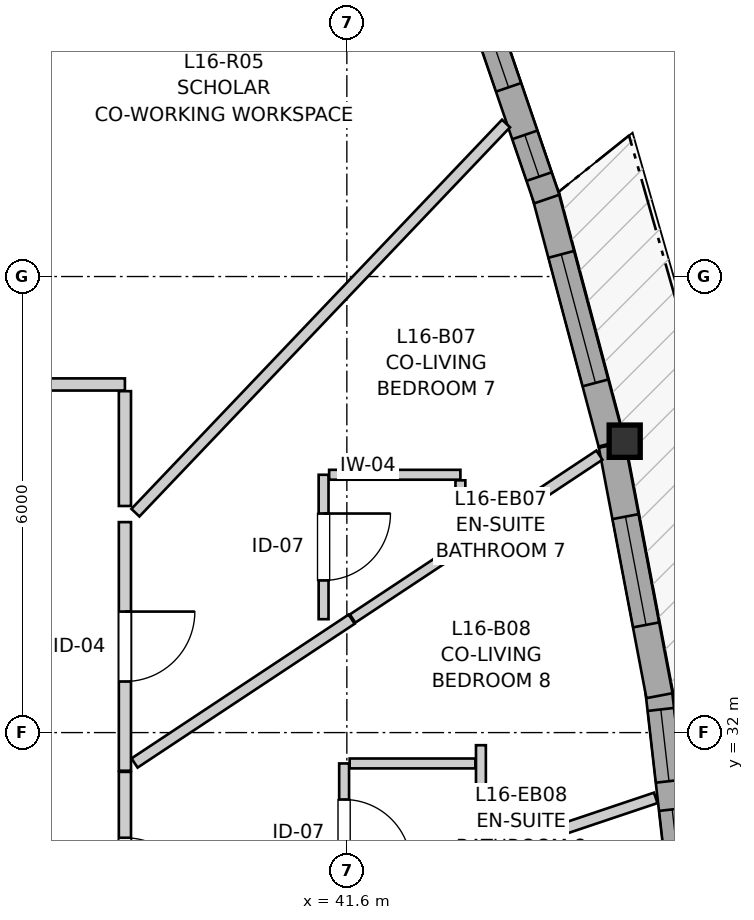
"""IFC4 building model, lengths in metres.
Left out: names, types, materials, properties, quantities, classifications, styles, units other than length and angle.
Written with IfcOpenShell. Run it as: python <this file> out.ifc"""

import sys

from ifc_helpers import new_model, si_unit, direction, frame, frame_2d, origin, origin_2d, place, context, subcontext, project, spatial, rectangle, i_section, extrude, source, transform, mapped, element, fill, save


model = new_model("IFC4")
c1 = context("Model", 3, precision=1e-05, world=origin(), true_north=direction((0.0, 1.0)))
c2 = subcontext(c1, "Body", "Model", "MODEL_VIEW")
j1 = project(units=[si_unit("LENGTHUNIT", "METRE"), si_unit("PLANEANGLEUNIT", "RADIAN")], contexts=[c1])
p1 = place(None, origin())
s1 = spatial("IfcSite", under=j1, at=p1, CompositionType="ELEMENT")
p2 = place(p1, origin())
s2 = spatial("IfcBuilding", under=s1, at=p2, CompositionType="ELEMENT")
p3 = place(p2, frame((0.0, 0.0, 55.8)))
s3 = spatial("IfcBuildingStorey", under=s2, at=p3, CompositionType="ELEMENT", Elevation=55.8)
m1 = source(origin(), c2, "Body", "SweptSolid", [
    extrude(i_section(OverallWidth=0.409, OverallDepth=0.425, WebThickness=0.03, FlangeThickness=0.048, FilletRadius=0.015, at=origin_2d()), origin(), (0.0, 0.0, 1.0), 2.94),
])
p4 = place(p3, frame((45.256, 35.834, 0.0), z_axis=(0.0, 0.0, 1.0), x_axis=(1.0, 0.0, 0.0)))
e1 = element("IfcColumn", 1, at=p4, inside=s3, PredefinedType="PILASTER", context=c2, shape_type="MappedRepresentation", body=[
    mapped(m1, transform((0.0, 0.0, 0.0), x_axis=(1.0, 0.0, 0.0), y_axis=(0.0, 1.0, 0.0), z_axis=(0.0, 0.0, 1.0), scale=1.0)),
])
p5 = place(p3, frame((46.044, 29.556, 0.0), z_axis=(0.0, 0.0, 1.0), x_axis=(-0.113263196818, 0.993565019637, 0.0)))
e2 = element("IfcWall", 2, at=p5, inside=s3, PredefinedType="SOLIDWALL", context=c2, shape_type="SweptSolid", body=[
    extrude(rectangle(XDim=3.037, YDim=0.35, at=frame_2d((1.519, 0.0))), origin(), (0.0, 0.0, 1.0), 2.42),
])
p6 = place(p5, frame((0.492, 0.0, 0.82)))
e3 = element("IfcOpeningElement", 3, at=p6, cuts=e2, PredefinedType="OPENING", context=c2, shape_type="SweptSolid", body=[
    extrude(rectangle(XDim=0.95, YDim=1.35, at=frame_2d((0.475, 0.675))), frame((0.0, 0.185, 0.0), z_axis=(0.0, -1.0, 0.0), x_axis=(1.0, 0.0, 0.0)), (0.0, 0.0, 1.0), 0.37),
])
p7 = place(p5, frame((1.816, 0.0, 0.82)))
e4 = element("IfcOpeningElement", 4, at=p7, cuts=e2, PredefinedType="OPENING", context=c2, shape_type="SweptSolid", body=[
    extrude(rectangle(XDim=0.95, YDim=1.35, at=frame_2d((0.475, 0.675))), frame((0.0, 0.185, 0.0), z_axis=(0.0, -1.0, 0.0), x_axis=(1.0, 0.0, 0.0)), (0.0, 0.0, 1.0), 0.37),
])
p8 = place(p3, frame((45.713, 32.486, 0.0), z_axis=(0.0, 0.0, 1.0), x_axis=(-0.186603748992, 0.982435260392, 0.0)))
e5 = element("IfcWall", 5, at=p8, inside=s3, PredefinedType="SOLIDWALL", context=c2, shape_type="SweptSolid", body=[
    extrude(rectangle(XDim=3.354, YDim=0.35, at=frame_2d((1.677, 0.0))), origin(), (0.0, 0.0, 1.0), 2.42),
])
p9 = place(p8, frame((0.948, 0.0, 0.82)))
e6 = element("IfcOpeningElement", 6, at=p9, cuts=e5, PredefinedType="OPENING", context=c2, shape_type="SweptSolid", body=[
    extrude(rectangle(XDim=1.45, YDim=1.25, at=frame_2d((0.725, 0.625))), frame((0.0, 0.185, 0.0), z_axis=(0.0, -1.0, 0.0), x_axis=(1.0, 0.0, 0.0)), (0.0, 0.0, 1.0), 0.37),
])
p10 = place(p3, frame((45.081, 35.808, 0.0), z_axis=(0.0, 0.0, 1.0), x_axis=(-0.257114470429, 0.966380954436, 0.0)))
e7 = element("IfcWall", 7, at=p10, inside=s3, PredefinedType="SOLIDWALL", context=c2, shape_type="SweptSolid", body=[
    extrude(rectangle(XDim=3.41, YDim=0.35, at=frame_2d((1.705, 0.0))), origin(), (0.0, 0.0, 1.0), 2.42),
])
p11 = place(p10, frame((0.82, 0.0, 0.82)))
e8 = element("IfcOpeningElement", 8, at=p11, cuts=e7, PredefinedType="OPENING", context=c2, shape_type="SweptSolid", body=[
    extrude(rectangle(XDim=1.75, YDim=1.3, at=frame_2d((0.875, 0.65))), frame((0.0, 0.185, 0.0), z_axis=(0.0, -1.0, 0.0), x_axis=(1.0, 0.0, 0.0)), (0.0, 0.0, 1.0), 0.37),
])
p12 = place(p3, frame((44.23, 39.019, 0.0), z_axis=(0.0, 0.0, 1.0), x_axis=(-0.323560153501, 0.94620760252, 0.0)))
e9 = element("IfcWall", 9, at=p12, inside=s3, PredefinedType="SOLIDWALL", context=c2, shape_type="SweptSolid", body=[
    extrude(rectangle(XDim=3.202, YDim=0.35, at=frame_2d((1.601, 0.0))), origin(), (0.0, 0.0, 1.0), 2.42),
])
p13 = place(p12, frame((0.312, 0.0, 0.82)))
e10 = element("IfcOpeningElement", 10, at=p13, cuts=e9, PredefinedType="OPENING", context=c2, shape_type="SweptSolid", body=[
    extrude(rectangle(XDim=0.58, YDim=1.35, at=frame_2d((0.29, 0.675))), frame((0.0, 0.185, 0.0), z_axis=(0.0, -1.0, 0.0), x_axis=(1.0, 0.0, 0.0)), (0.0, 0.0, 1.0), 0.37),
])
p14 = place(p12, frame((1.554, 0.0, 0.82)))
e11 = element("IfcOpeningElement", 11, at=p14, cuts=e9, PredefinedType="OPENING", context=c2, shape_type="SweptSolid", body=[
    extrude(rectangle(XDim=1.15, YDim=1.2, at=frame_2d((0.575, 0.6))), frame((0.0, 0.185, 0.0), z_axis=(0.0, -1.0, 0.0), x_axis=(1.0, 0.0, 0.0)), (0.0, 0.0, 1.0), 0.37),
])
p15 = place(p3, frame((35.011, 36.58, 0.0), z_axis=(0.0, 0.0, 1.0), x_axis=(1.0, 0.0, 0.0)))
e12 = element("IfcWall", 12, at=p15, inside=s3, PredefinedType="PARTITIONING", context=c2, shape_type="SweptSolid", body=[
    extrude(rectangle(XDim=3.669, YDim=0.16, at=frame_2d((1.834, 0.0))), origin(), (0.0, 0.0, 1.0), 2.94),
])
p16 = place(p15, frame((1.363, 0.0, 0.0)))
e13 = element("IfcOpeningElement", 13, at=p16, cuts=e12, PredefinedType="OPENING", context=c2, shape_type="SweptSolid", body=[
    extrude(rectangle(XDim=0.96, YDim=2.1, at=frame_2d((0.48, 1.05))), frame((0.0, 0.09, 0.0), z_axis=(0.0, -1.0, 0.0), x_axis=(1.0, 0.0, 0.0)), (0.0, 0.0, 1.0), 0.18),
])
p17 = place(p3, frame((38.68, 34.769, 0.0), z_axis=(0.0, 0.0, 1.0), x_axis=(0.0, -1.0, 0.0)))
e14 = element("IfcWall", 14, at=p17, inside=s3, PredefinedType="PARTITIONING", context=c2, shape_type="SweptSolid", body=[
    extrude(rectangle(XDim=3.271, YDim=0.16, at=frame_2d((1.635, 0.0))), origin(), (0.0, 0.0, 1.0), 2.94),
])
p18 = place(p17, frame((1.177, 0.0, 0.0)))
e15 = element("IfcOpeningElement", 15, at=p18, cuts=e14, PredefinedType="OPENING", context=c2, shape_type="SweptSolid", body=[
    extrude(rectangle(XDim=0.92, YDim=2.1, at=frame_2d((0.46, 1.05))), frame((0.0, 0.09, 0.0), z_axis=(0.0, -1.0, 0.0), x_axis=(1.0, 0.0, 0.0)), (0.0, 0.0, 1.0), 0.18),
])
p19 = place(p3, frame((38.68, 31.483, 0.0), z_axis=(0.0, 0.0, 1.0), x_axis=(0.0, -1.0, 0.0)))
e16 = element("IfcWall", 16, at=p19, inside=s3, PredefinedType="PARTITIONING", context=c2, shape_type="SweptSolid", body=[
    extrude(rectangle(XDim=2.702, YDim=0.16, at=frame_2d((1.351, 0.0))), origin(), (0.0, 0.0, 1.0), 2.94),
])
p20 = place(p19, frame((0.866, 0.0, 0.0)))
e17 = element("IfcOpeningElement", 17, at=p20, cuts=e16, PredefinedType="OPENING", context=c2, shape_type="SweptSolid", body=[
    extrude(rectangle(XDim=0.92, YDim=2.1, at=frame_2d((0.46, 1.05))), frame((0.0, 0.09, 0.0), z_axis=(0.0, -1.0, 0.0), x_axis=(1.0, 0.0, 0.0)), (0.0, 0.0, 1.0), 0.18),
])
p21 = place(p3, frame((41.294, 35.392, 0.0), z_axis=(0.0, 0.0, 1.0), x_axis=(0.0, -1.0, 0.0)))
e18 = element("IfcWall", 18, at=p21, inside=s3, PredefinedType="PARTITIONING", context=c2, shape_type="SweptSolid", body=[
    extrude(rectangle(XDim=1.9, YDim=0.13, at=frame_2d((0.95, 0.0))), origin(), (0.0, 0.0, 1.0), 2.94),
])
p22 = place(p21, frame((0.51, 0.0, 0.0)))
e19 = element("IfcOpeningElement", 19, at=p22, cuts=e18, PredefinedType="OPENING", context=c2, shape_type="SweptSolid", body=[
    extrude(rectangle(XDim=0.88, YDim=2.05, at=frame_2d((0.44, 1.025))), frame((0.0, 0.075, 0.0), z_axis=(0.0, -1.0, 0.0), x_axis=(1.0, 0.0, 0.0)), (0.0, 0.0, 1.0), 0.15),
])
p23 = place(p3, frame((41.564, 31.594, 0.0), z_axis=(0.0, 0.0, 1.0), x_axis=(0.0, -1.0, 0.0)))
e20 = element("IfcWall", 20, at=p23, inside=s3, PredefinedType="PARTITIONING", context=c2, shape_type="SweptSolid", body=[
    extrude(rectangle(XDim=1.829, YDim=0.13, at=frame_2d((0.915, 0.0))), origin(), (0.0, 0.0, 1.0), 2.94),
])
p24 = place(p23, frame((0.475, 0.0, 0.0)))
e21 = element("IfcOpeningElement", 21, at=p24, cuts=e20, PredefinedType="OPENING", context=c2, shape_type="SweptSolid", body=[
    extrude(rectangle(XDim=0.88, YDim=2.05, at=frame_2d((0.44, 1.025))), frame((0.0, 0.075, 0.0), z_axis=(0.0, -1.0, 0.0), x_axis=(1.0, 0.0, 0.0)), (0.0, 0.0, 1.0), 0.15),
])
p25 = place(p3, frame((35.079, 36.697, 0.0), z_axis=(0.0, 0.0, 1.0), x_axis=(0.404349483928, 0.914604556542, 0.0)))
e22 = element("IfcWall", 22, at=p25, inside=s3, PredefinedType="PARTITIONING", context=c2, shape_type="SweptSolid", body=[
    extrude(rectangle(XDim=11.54, YDim=0.145, at=frame_2d((5.77, 0.0))), origin(), (0.0, 0.0, 1.0), 2.94),
])
p26 = place(p3, frame((38.818, 34.893, 0.0), z_axis=(0.0, 0.0, 1.0), x_axis=(0.68961378572, 0.724177344678, 0.0)))
e23 = element("IfcWall", 23, at=p26, inside=s3, PredefinedType="PARTITIONING", context=c2, shape_type="SweptSolid", body=[
    extrude(rectangle(XDim=7.071, YDim=0.145, at=frame_2d((3.535, 0.0))), origin(), (0.0, 0.0, 1.0), 2.94),
])
p27 = place(p3, frame((38.807, 31.6, 0.0), z_axis=(0.0, 0.0, 1.0), x_axis=(0.833690999351, 0.552231217518, 0.0)))
e24 = element("IfcWall", 24, at=p27, inside=s3, PredefinedType="PARTITIONING", context=c2, shape_type="SweptSolid", body=[
    extrude(rectangle(XDim=3.426, YDim=0.145, at=frame_2d((1.713, 0.0))), origin(), (0.0, 0.0, 1.0), 2.94),
])
p28 = place(p3, frame((43.445, 30.396, 0.0), z_axis=(0.0, 0.0, 1.0), x_axis=(0.947971837268, 0.318354198568, 0.0)))
e25 = element("IfcWall", 25, at=p28, inside=s3, PredefinedType="PARTITIONING", context=c2, shape_type="SweptSolid", body=[
    extrude(rectangle(XDim=2.341, YDim=0.145, at=frame_2d((1.171, 0.0))), origin(), (0.0, 0.0, 1.0), 2.94),
])
p29 = place(p3, frame((43.094, 34.439, 0.0), z_axis=(0.0, 0.0, 1.0), x_axis=(0.833690342454, 0.552232209219, 0.0)))
e26 = element("IfcWall", 26, at=p29, inside=s3, PredefinedType="PARTITIONING", context=c2, shape_type="SweptSolid", body=[
    extrude(rectangle(XDim=2.194, YDim=0.145, at=frame_2d((1.097, 0.0))), origin(), (0.0, 0.0, 1.0), 2.94),
])
p30 = place(p3, frame((41.367, 35.392, 0.0), z_axis=(0.0, 0.0, 1.0), x_axis=(1.0, 0.0, 0.0)))
e27 = element("IfcWall", 27, at=p30, inside=s3, PredefinedType="PARTITIONING", context=c2, shape_type="SweptSolid", body=[
    extrude(rectangle(XDim=1.727, YDim=0.13, at=frame_2d((0.864, 0.0))), origin(), (0.0, 0.0, 1.0), 2.94),
])
p31 = place(p3, frame((41.637, 31.594, 0.0), z_axis=(0.0, 0.0, 1.0), x_axis=(1.0, 0.0, 0.0)))
e28 = element("IfcWall", 28, at=p31, inside=s3, PredefinedType="PARTITIONING", context=c2, shape_type="SweptSolid", body=[
    extrude(rectangle(XDim=1.654, YDim=0.13, at=frame_2d((0.827, 0.0))), origin(), (0.0, 0.0, 1.0), 2.94),
])
p32 = place(p3, frame((38.68, 34.981, 0.0), z_axis=(0.0, 0.0, 1.0), x_axis=(0.0, 1.0, 0.0)))
e29 = element("IfcWall", 29, at=p32, inside=s3, PredefinedType="PARTITIONING", context=c2, shape_type="SweptSolid", body=[
    extrude(rectangle(XDim=1.511, YDim=0.16, at=frame_2d((0.755, 0.0))), origin(), (0.0, 0.0, 1.0), 2.94),
])
p33 = place(p3, frame((41.676, 33.5, 0.0), z_axis=(0.0, 0.0, 1.0), x_axis=(0.833939065936, 0.55185653417, 0.0)))
e30 = element("IfcWall", 30, at=p33, inside=s3, PredefinedType="PARTITIONING", context=c2, shape_type="SweptSolid", body=[
    extrude(rectangle(XDim=1.686, YDim=0.13, at=frame_2d((0.843, 0.0))), origin(), (0.0, 0.0, 1.0), 2.94),
])
p34 = place(p3, frame((43.364, 30.129, 0.0), z_axis=(0.0, 0.0, 1.0), x_axis=(0.0, 1.0, 0.0)))
e31 = element("IfcWall", 31, at=p34, inside=s3, PredefinedType="PARTITIONING", context=c2, shape_type="SweptSolid", body=[
    extrude(rectangle(XDim=1.705, YDim=0.13, at=frame_2d((0.853, 0.0))), origin(), (0.0, 0.0, 1.0), 2.94),
])
p35 = place(p3, frame((43.094, 34.577, 0.0), z_axis=(0.0, 0.0, 1.0), x_axis=(0.0, 1.0, 0.0)))
e32 = element("IfcWall", 32, at=p35, inside=s3, PredefinedType="PARTITIONING", context=c2, shape_type="SweptSolid", body=[
    extrude(rectangle(XDim=0.742, YDim=0.13, at=frame_2d((0.371, 0.0))), origin(), (0.0, 0.0, 1.0), 2.94),
])
m2 = source(origin(), c2, "Body", "SweptSolid", [
    extrude(rectangle(XDim=0.95, YDim=1.35, at=frame_2d((0.475, 0.675))), frame((0.0, 0.03, 0.0), z_axis=(0.0, -1.0, 0.0), x_axis=(1.0, 0.0, 0.0)), (0.0, 0.0, 1.0), 0.06),
])
p36 = place(p6, origin())
e33 = element("IfcWindow", 33, at=p36, inside=s3, PartitioningType="SINGLE_PANEL", PredefinedType="WINDOW", context=c2, shape_type="MappedRepresentation", body=[
    mapped(m2, transform((0.0, 0.0, 0.0), x_axis=(1.0, 0.0, 0.0), y_axis=(0.0, 1.0, 0.0), z_axis=(0.0, 0.0, 1.0), scale=1.0)),
])
fill(e3, e33)
p37 = place(p7, origin())
e34 = element("IfcWindow", 34, at=p37, inside=s3, PartitioningType="SINGLE_PANEL", PredefinedType="WINDOW", context=c2, shape_type="MappedRepresentation", body=[
    mapped(m2, transform((0.0, 0.0, 0.0), x_axis=(1.0, 0.0, 0.0), y_axis=(0.0, 1.0, 0.0), z_axis=(0.0, 0.0, 1.0), scale=1.0)),
])
fill(e4, e34)
m3 = source(origin(), c2, "Body", "SweptSolid", [
    extrude(rectangle(XDim=1.45, YDim=1.25, at=frame_2d((0.725, 0.625))), frame((0.0, 0.03, 0.0), z_axis=(0.0, -1.0, 0.0), x_axis=(1.0, 0.0, 0.0)), (0.0, 0.0, 1.0), 0.06),
])
p38 = place(p9, origin())
e35 = element("IfcWindow", 35, at=p38, inside=s3, PartitioningType="SINGLE_PANEL", PredefinedType="WINDOW", context=c2, shape_type="MappedRepresentation", body=[
    mapped(m3, transform((0.0, 0.0, 0.0), x_axis=(1.0, 0.0, 0.0), y_axis=(0.0, 1.0, 0.0), z_axis=(0.0, 0.0, 1.0), scale=1.0)),
])
fill(e6, e35)
m4 = source(origin(), c2, "Body", "SweptSolid", [
    extrude(rectangle(XDim=1.75, YDim=1.3, at=frame_2d((0.875, 0.65))), frame((0.0, 0.03, 0.0), z_axis=(0.0, -1.0, 0.0), x_axis=(1.0, 0.0, 0.0)), (0.0, 0.0, 1.0), 0.06),
])
p39 = place(p11, origin())
e36 = element("IfcWindow", 36, at=p39, inside=s3, PartitioningType="SINGLE_PANEL", PredefinedType="WINDOW", context=c2, shape_type="MappedRepresentation", body=[
    mapped(m4, transform((0.0, 0.0, 0.0), x_axis=(1.0, 0.0, 0.0), y_axis=(0.0, 1.0, 0.0), z_axis=(0.0, 0.0, 1.0), scale=1.0)),
])
fill(e8, e36)
m5 = source(origin(), c2, "Body", "SweptSolid", [
    extrude(rectangle(XDim=0.58, YDim=1.35, at=frame_2d((0.29, 0.675))), frame((0.0, 0.03, 0.0), z_axis=(0.0, -1.0, 0.0), x_axis=(1.0, 0.0, 0.0)), (0.0, 0.0, 1.0), 0.06),
])
p40 = place(p13, origin())
e37 = element("IfcWindow", 37, at=p40, inside=s3, PartitioningType="SINGLE_PANEL", PredefinedType="WINDOW", context=c2, shape_type="MappedRepresentation", body=[
    mapped(m5, transform((0.0, 0.0, 0.0), x_axis=(1.0, 0.0, 0.0), y_axis=(0.0, 1.0, 0.0), z_axis=(0.0, 0.0, 1.0), scale=1.0)),
])
fill(e10, e37)
m6 = source(origin(), c2, "Body", "SweptSolid", [
    extrude(rectangle(XDim=1.15, YDim=1.2, at=frame_2d((0.575, 0.6))), frame((0.0, 0.03, 0.0), z_axis=(0.0, -1.0, 0.0), x_axis=(1.0, 0.0, 0.0)), (0.0, 0.0, 1.0), 0.06),
])
p41 = place(p14, origin())
e38 = element("IfcWindow", 38, at=p41, inside=s3, PartitioningType="SINGLE_PANEL", PredefinedType="WINDOW", context=c2, shape_type="MappedRepresentation", body=[
    mapped(m6, transform((0.0, 0.0, 0.0), x_axis=(1.0, 0.0, 0.0), y_axis=(0.0, 1.0, 0.0), z_axis=(0.0, 0.0, 1.0), scale=1.0)),
])
fill(e11, e38)
m7 = source(origin(), c2, "Body", "SweptSolid", [
    extrude(rectangle(XDim=0.92, YDim=2.1, at=frame_2d((0.46, 1.05))), frame((0.0, 0.025, 0.0), z_axis=(0.0, -1.0, 0.0), x_axis=(1.0, 0.0, 0.0)), (0.0, 0.0, 1.0), 0.05),
])
p42 = place(p18, origin())
e39 = element("IfcDoor", 39, at=p42, inside=s3, OperationType="SINGLE_SWING_LEFT", PredefinedType="DOOR", context=c2, shape_type="MappedRepresentation", body=[
    mapped(m7, transform((0.0, 0.0, 0.0), x_axis=(1.0, 0.0, 0.0), y_axis=(0.0, 1.0, 0.0), z_axis=(0.0, 0.0, 1.0), scale=1.0)),
])
fill(e15, e39)
p43 = place(p20, origin())
e40 = element("IfcDoor", 40, at=p43, inside=s3, OperationType="SINGLE_SWING_RIGHT", PredefinedType="DOOR", context=c2, shape_type="MappedRepresentation", body=[
    mapped(m7, transform((0.0, 0.0, 0.0), x_axis=(1.0, 0.0, 0.0), y_axis=(0.0, 1.0, 0.0), z_axis=(0.0, 0.0, 1.0), scale=1.0)),
])
fill(e17, e40)
m8 = source(origin(), c2, "Body", "SweptSolid", [
    extrude(rectangle(XDim=0.88, YDim=2.05, at=frame_2d((0.44, 1.025))), frame((0.0, 0.025, 0.0), z_axis=(0.0, -1.0, 0.0), x_axis=(1.0, 0.0, 0.0)), (0.0, 0.0, 1.0), 0.05),
])
p44 = place(p22, origin())
e41 = element("IfcDoor", 41, at=p44, inside=s3, OperationType="SINGLE_SWING_LEFT", PredefinedType="DOOR", context=c2, shape_type="MappedRepresentation", body=[
    mapped(m8, transform((0.0, 0.0, 0.0), x_axis=(1.0, 0.0, 0.0), y_axis=(0.0, 1.0, 0.0), z_axis=(0.0, 0.0, 1.0), scale=1.0)),
])
fill(e19, e41)
p45 = place(p24, origin())
e42 = element("IfcDoor", 42, at=p45, inside=s3, OperationType="SINGLE_SWING_RIGHT", PredefinedType="DOOR", context=c2, shape_type="MappedRepresentation", body=[
    mapped(m8, transform((0.0, 0.0, 0.0), x_axis=(1.0, 0.0, 0.0), y_axis=(0.0, 1.0, 0.0), z_axis=(0.0, 0.0, 1.0), scale=1.0)),
])
fill(e21, e42)
save(model, sys.argv[1])
